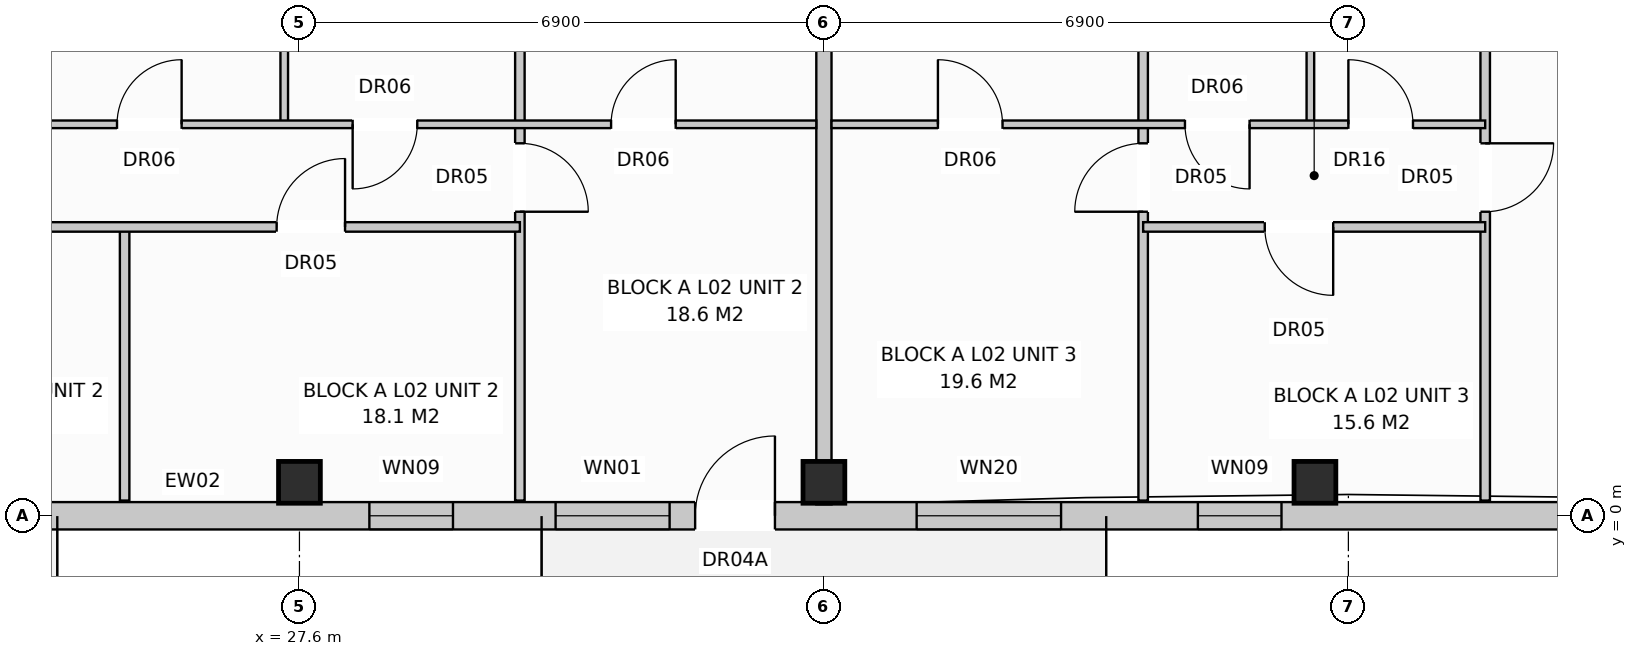
"""IFC4 building model, lengths in metres.
Left out: names, types, materials, properties, quantities, classifications, styles, units other than length and angle.
Written with IfcOpenShell. Run it as: python <this file> out.ifc"""

import sys

from ifc_helpers import new_model, si_unit, direction, frame, frame_2d, origin, origin_with_axes, origin_2d, place, context, subcontext, project, spatial, rectangle, extrude, element, fill, save


model = new_model("IFC4")
c1 = context("Model", 3, precision=1e-05, world=origin(), true_north=direction((0.0, 1.0)))
c2 = subcontext(c1, "Body", "Model", "MODEL_VIEW")
j1 = project(units=[si_unit("LENGTHUNIT", "METRE"), si_unit("PLANEANGLEUNIT", "RADIAN")], contexts=[c1])
p1 = place(None, origin())
s1 = spatial("IfcSite", under=j1, at=p1, CompositionType="ELEMENT")
p2 = place(p1, origin())
s2 = spatial("IfcBuilding", under=s1, at=p2, CompositionType="ELEMENT")
p3 = place(p2, frame((0.0, 0.0, 8.0)))
s3 = spatial("IfcBuildingStorey", under=s2, at=p3, CompositionType="ELEMENT", Elevation=8.0)
for number, where, z_axis, x_axis in (
    (1, (27.6, 0.44, 0.0), (0.0, 0.0, 1.0), (1.0, 0.0, 0.0)),
    (2, (34.5, 0.44, 0.0), (0.0, 0.0, 1.0), (1.0, 0.0, 0.0)),
    (3, (40.96, 0.44, 0.0), (0.0, 0.0, 1.0), (1.0, 0.0, 0.0)),
):
    element("IfcColumn", number, at=place(p3, frame(where, z_axis=z_axis, x_axis=x_axis)), inside=s3, PredefinedType="COLUMN", context=c2, shape_type="SweptSolid", body=[
        extrude(rectangle(XDim=0.55, YDim=0.55, at=origin_2d()), origin(), (0.0, 0.0, 1.0), 3.2),
    ])
p4 = place(p3, frame((0.17, 0.0, 0.0), z_axis=(0.0, 0.0, 1.0), x_axis=(1.0, 0.0, 0.0)))
e4 = element("IfcWall", 4, at=p4, inside=s3, PredefinedType="STANDARD", context=c2, shape_type="SweptSolid", body=[
    extrude(rectangle(XDim=54.86, YDim=0.36, at=frame_2d((27.43, 0.0))), origin(), (0.0, 0.0, 1.0), 2.94),
])
p5 = place(p4, frame((3.736, 0.0, 0.0)))
e5 = element("IfcOpeningElement", 5, at=p5, cuts=e4, PredefinedType="OPENING", context=c2, shape_type="SweptSolid", body=[
    extrude(rectangle(XDim=1.05, YDim=2.12, at=frame_2d((0.525, 1.06))), frame((0.0, 0.192, 0.0), z_axis=(0.0, -1.0, 0.0), x_axis=(1.0, 0.0, 0.0)), (0.0, 0.0, 1.0), 0.384),
])
p6 = place(p4, frame((18.636, 0.0, 0.0)))
e6 = element("IfcOpeningElement", 6, at=p6, cuts=e4, PredefinedType="OPENING", context=c2, shape_type="SweptSolid", body=[
    extrude(rectangle(XDim=1.05, YDim=2.12, at=frame_2d((0.525, 1.06))), frame((0.0, 0.192, 0.0), z_axis=(0.0, -1.0, 0.0), x_axis=(1.0, 0.0, 0.0)), (0.0, 0.0, 1.0), 0.384),
])
p7 = place(p4, frame((32.636, 0.0, 0.0)))
e7 = element("IfcOpeningElement", 7, at=p7, cuts=e4, PredefinedType="OPENING", context=c2, shape_type="SweptSolid", body=[
    extrude(rectangle(XDim=1.05, YDim=2.12, at=frame_2d((0.525, 1.06))), frame((0.0, 0.192, 0.0), z_axis=(0.0, -1.0, 0.0), x_axis=(1.0, 0.0, 0.0)), (0.0, 0.0, 1.0), 0.384),
])
p8 = place(p4, frame((46.441, 0.0, 0.0)))
e8 = element("IfcOpeningElement", 8, at=p8, cuts=e4, PredefinedType="OPENING", context=c2, shape_type="SweptSolid", body=[
    extrude(rectangle(XDim=1.05, YDim=2.12, at=frame_2d((0.525, 1.06))), frame((0.0, 0.192, 0.0), z_axis=(0.0, -1.0, 0.0), x_axis=(1.0, 0.0, 0.0)), (0.0, 0.0, 1.0), 0.384),
])
p9 = place(p4, frame((1.95, 0.0, 0.72)))
e9 = element("IfcOpeningElement", 9, at=p9, cuts=e4, PredefinedType="OPENING", context=c2, shape_type="SweptSolid", body=[
    extrude(rectangle(XDim=1.1, YDim=1.5, at=frame_2d((0.55, 0.75))), frame((0.0, 0.192, 0.0), z_axis=(0.0, -1.0, 0.0), x_axis=(1.0, 0.0, 0.0)), (0.0, 0.0, 1.0), 0.384),
])
p10 = place(p4, frame((7.232, 0.0, 0.72)))
e10 = element("IfcOpeningElement", 10, at=p10, cuts=e4, PredefinedType="OPENING", context=c2, shape_type="SweptSolid", body=[
    extrude(rectangle(XDim=1.9, YDim=1.85, at=frame_2d((0.95, 0.925))), frame((0.0, 0.192, 0.0), z_axis=(0.0, -1.0, 0.0), x_axis=(1.0, 0.0, 0.0)), (0.0, 0.0, 1.0), 0.384),
])
p11 = place(p4, frame((10.85, 0.0, 0.72)))
e11 = element("IfcOpeningElement", 11, at=p11, cuts=e4, PredefinedType="OPENING", context=c2, shape_type="SweptSolid", body=[
    extrude(rectangle(XDim=1.1, YDim=1.5, at=frame_2d((0.55, 0.75))), frame((0.0, 0.192, 0.0), z_axis=(0.0, -1.0, 0.0), x_axis=(1.0, 0.0, 0.0)), (0.0, 0.0, 1.0), 0.384),
])
p12 = place(p4, frame((16.25, 0.0, 0.72)))
e12 = element("IfcOpeningElement", 12, at=p12, cuts=e4, PredefinedType="OPENING", context=c2, shape_type="SweptSolid", body=[
    extrude(rectangle(XDim=1.1, YDim=1.5, at=frame_2d((0.55, 0.75))), frame((0.0, 0.192, 0.0), z_axis=(0.0, -1.0, 0.0), x_axis=(1.0, 0.0, 0.0)), (0.0, 0.0, 1.0), 0.384),
])
p13 = place(p4, frame((21.55, 0.0, 0.72)))
e13 = element("IfcOpeningElement", 13, at=p13, cuts=e4, PredefinedType="OPENING", context=c2, shape_type="SweptSolid", body=[
    extrude(rectangle(XDim=1.9, YDim=1.85, at=frame_2d((0.95, 0.925))), frame((0.0, 0.192, 0.0), z_axis=(0.0, -1.0, 0.0), x_axis=(1.0, 0.0, 0.0)), (0.0, 0.0, 1.0), 0.384),
])
p14 = place(p4, frame((28.35, 0.0, 0.72)))
e14 = element("IfcOpeningElement", 14, at=p14, cuts=e4, PredefinedType="OPENING", context=c2, shape_type="SweptSolid", body=[
    extrude(rectangle(XDim=1.1, YDim=1.5, at=frame_2d((0.55, 0.75))), frame((0.0, 0.192, 0.0), z_axis=(0.0, -1.0, 0.0), x_axis=(1.0, 0.0, 0.0)), (0.0, 0.0, 1.0), 0.384),
])
p15 = place(p4, frame((30.8, 0.0, 0.85)))
e15 = element("IfcOpeningElement", 15, at=p15, cuts=e4, PredefinedType="OPENING", context=c2, shape_type="SweptSolid", body=[
    extrude(rectangle(XDim=1.5, YDim=1.65, at=frame_2d((0.75, 0.825))), frame((0.0, 0.192, 0.0), z_axis=(0.0, -1.0, 0.0), x_axis=(1.0, 0.0, 0.0)), (0.0, 0.0, 1.0), 0.384),
])
p16 = place(p4, frame((35.55, 0.0, 0.72)))
e16 = element("IfcOpeningElement", 16, at=p16, cuts=e4, PredefinedType="OPENING", context=c2, shape_type="SweptSolid", body=[
    extrude(rectangle(XDim=1.9, YDim=1.85, at=frame_2d((0.95, 0.925))), frame((0.0, 0.192, 0.0), z_axis=(0.0, -1.0, 0.0), x_axis=(1.0, 0.0, 0.0)), (0.0, 0.0, 1.0), 0.384),
])
p17 = place(p4, frame((39.25, 0.0, 0.72)))
e17 = element("IfcOpeningElement", 17, at=p17, cuts=e4, PredefinedType="OPENING", context=c2, shape_type="SweptSolid", body=[
    extrude(rectangle(XDim=1.1, YDim=1.5, at=frame_2d((0.55, 0.75))), frame((0.0, 0.192, 0.0), z_axis=(0.0, -1.0, 0.0), x_axis=(1.0, 0.0, 0.0)), (0.0, 0.0, 1.0), 0.384),
])
p18 = place(p4, frame((44.3, 0.0, 0.8)))
e18 = element("IfcOpeningElement", 18, at=p18, cuts=e4, PredefinedType="OPENING", context=c2, shape_type="SweptSolid", body=[
    extrude(rectangle(XDim=1.8, YDim=1.7, at=frame_2d((0.9, 0.85))), frame((0.0, 0.192, 0.0), z_axis=(0.0, -1.0, 0.0), x_axis=(1.0, 0.0, 0.0)), (0.0, 0.0, 1.0), 0.384),
])
p19 = place(p4, frame((49.15, 0.0, 0.72)))
e19 = element("IfcOpeningElement", 19, at=p19, cuts=e4, PredefinedType="OPENING", context=c2, shape_type="SweptSolid", body=[
    extrude(rectangle(XDim=1.9, YDim=1.85, at=frame_2d((0.95, 0.925))), frame((0.0, 0.192, 0.0), z_axis=(0.0, -1.0, 0.0), x_axis=(1.0, 0.0, 0.0)), (0.0, 0.0, 1.0), 0.384),
])
p20 = place(p4, frame((52.95, 0.0, 0.72)))
e20 = element("IfcOpeningElement", 20, at=p20, cuts=e4, PredefinedType="OPENING", context=c2, shape_type="SweptSolid", body=[
    extrude(rectangle(XDim=1.1, YDim=1.5, at=frame_2d((0.55, 0.75))), frame((0.0, 0.192, 0.0), z_axis=(0.0, -1.0, 0.0), x_axis=(1.0, 0.0, 0.0)), (0.0, 0.0, 1.0), 0.384),
])
p21 = place(p3, frame((34.5, 7.85, 0.0), z_axis=(0.0, 0.0, 1.0), x_axis=(0.0, -1.0, 0.0)))
e21 = element("IfcWall", 21, at=p21, inside=s3, PredefinedType="PARTITIONING", context=c2, shape_type="SweptSolid", body=[
    extrude(rectangle(XDim=7.7, YDim=0.2, at=frame_2d((3.85, 0.0))), origin(), (0.0, 0.0, 1.0), 2.94),
])
p22 = place(p3, frame((27.4, 7.85, 0.0), z_axis=(0.0, 0.0, 1.0), x_axis=(0.0, -1.0, 0.0)))
e22 = element("IfcWall", 22, at=p22, inside=s3, PredefinedType="PARTITIONING", context=c2, shape_type="SweptSolid", body=[
    extrude(rectangle(XDim=2.7, YDim=0.1, at=frame_2d((1.35, 0.0))), origin(), (0.0, 0.0, 1.0), 2.94),
])
p23 = place(p3, frame((25.3, 3.8, 0.0), z_axis=(0.0, 0.0, 1.0), x_axis=(0.0, -1.0, 0.0)))
e23 = element("IfcWall", 23, at=p23, inside=s3, PredefinedType="PARTITIONING", context=c2, shape_type="SweptSolid", body=[
    extrude(rectangle(XDim=3.6, YDim=0.125, at=frame_2d((1.8, 0.0))), origin(), (0.0, 0.0, 1.0), 2.59),
])
p24 = place(p3, frame((30.5, 7.85, 0.0), z_axis=(0.0, 0.0, 1.0), x_axis=(0.0, -1.0, 0.0)))
e24 = element("IfcWall", 24, at=p24, inside=s3, PredefinedType="PARTITIONING", context=c2, shape_type="SweptSolid", body=[
    extrude(rectangle(XDim=7.65, YDim=0.125, at=frame_2d((3.825, 0.0))), origin(), (0.0, 0.0, 1.0), 2.94),
])
p25 = place(p24, frame((2.95, 0.0, 0.0)))
e25 = element("IfcOpeningElement", 25, at=p25, cuts=e24, PredefinedType="OPENING", context=c2, shape_type="SweptSolid", body=[
    extrude(rectangle(XDim=0.9, YDim=2.1, at=frame_2d((0.45, 1.05))), frame((0.0, 0.074, 0.0), z_axis=(0.0, -1.0, 0.0), x_axis=(1.0, 0.0, 0.0)), (0.0, 0.0, 1.0), 0.149),
])
p26 = place(p3, frame((20.1, 5.15, 0.0), z_axis=(0.0, 0.0, 1.0), x_axis=(1.0, 0.0, 0.0)))
e26 = element("IfcWall", 26, at=p26, inside=s3, PredefinedType="PARTITIONING", context=c2, shape_type="SweptSolid", body=[
    extrude(rectangle(XDim=14.3, YDim=0.1, at=frame_2d((7.15, 0.0))), origin(), (0.0, 0.0, 1.0), 2.94),
])
p27 = place(p26, frame((1.6, 0.0, 0.0)))
e27 = element("IfcOpeningElement", 27, at=p27, cuts=e26, PredefinedType="OPENING", context=c2, shape_type="SweptSolid", body=[
    extrude(rectangle(XDim=0.9, YDim=2.1, at=frame_2d((0.45, 1.05))), frame((0.0, 0.062, 0.0), z_axis=(0.0, -1.0, 0.0), x_axis=(1.0, 0.0, 0.0)), (0.0, 0.0, 1.0), 0.124),
])
p28 = place(p26, frame((5.1, 0.0, 0.0)))
e28 = element("IfcOpeningElement", 28, at=p28, cuts=e26, PredefinedType="OPENING", context=c2, shape_type="SweptSolid", body=[
    extrude(rectangle(XDim=0.85, YDim=2.05, at=frame_2d((0.425, 1.025))), frame((0.0, 0.062, 0.0), z_axis=(0.0, -1.0, 0.0), x_axis=(1.0, 0.0, 0.0)), (0.0, 0.0, 1.0), 0.124),
])
p29 = place(p26, frame((8.2, 0.0, 0.0)))
e29 = element("IfcOpeningElement", 29, at=p29, cuts=e26, PredefinedType="OPENING", context=c2, shape_type="SweptSolid", body=[
    extrude(rectangle(XDim=0.85, YDim=2.05, at=frame_2d((0.425, 1.025))), frame((0.0, 0.062, 0.0), z_axis=(0.0, -1.0, 0.0), x_axis=(1.0, 0.0, 0.0)), (0.0, 0.0, 1.0), 0.124),
])
p30 = place(p26, frame((11.6, 0.0, 0.0)))
e30 = element("IfcOpeningElement", 30, at=p30, cuts=e26, PredefinedType="OPENING", context=c2, shape_type="SweptSolid", body=[
    extrude(rectangle(XDim=0.85, YDim=2.05, at=frame_2d((0.425, 1.025))), frame((0.0, 0.062, 0.0), z_axis=(0.0, -1.0, 0.0), x_axis=(1.0, 0.0, 0.0)), (0.0, 0.0, 1.0), 0.124),
])
p31 = place(p3, frame((20.1, 3.8, 0.0), z_axis=(0.0, 0.0, 1.0), x_axis=(1.0, 0.0, 0.0)))
e31 = element("IfcWall", 31, at=p31, inside=s3, PredefinedType="PARTITIONING", context=c2, shape_type="SweptSolid", body=[
    extrude(rectangle(XDim=10.4, YDim=0.125, at=frame_2d((5.2, 0.0))), origin(), (0.0, 0.0, 1.0), 2.94),
])
p32 = place(p31, frame((2.0, 0.0, 0.0)))
e32 = element("IfcOpeningElement", 32, at=p32, cuts=e31, PredefinedType="OPENING", context=c2, shape_type="SweptSolid", body=[
    extrude(rectangle(XDim=0.9, YDim=2.1, at=frame_2d((0.45, 1.05))), frame((0.0, 0.074, 0.0), z_axis=(0.0, -1.0, 0.0), x_axis=(1.0, 0.0, 0.0)), (0.0, 0.0, 1.0), 0.149),
])
p33 = place(p31, frame((7.2, 0.0, 0.0)))
e33 = element("IfcOpeningElement", 33, at=p33, cuts=e31, PredefinedType="OPENING", context=c2, shape_type="SweptSolid", body=[
    extrude(rectangle(XDim=0.9, YDim=2.1, at=frame_2d((0.45, 1.05))), frame((0.0, 0.074, 0.0), z_axis=(0.0, -1.0, 0.0), x_axis=(1.0, 0.0, 0.0)), (0.0, 0.0, 1.0), 0.149),
])
p34 = place(p3, frame((43.2, 7.85, 0.0), z_axis=(0.0, 0.0, 1.0), x_axis=(0.0, -1.0, 0.0)))
e34 = element("IfcWall", 34, at=p34, inside=s3, PredefinedType="PARTITIONING", context=c2, shape_type="SweptSolid", body=[
    extrude(rectangle(XDim=7.65, YDim=0.125, at=frame_2d((3.825, 0.0))), origin(), (0.0, 0.0, 1.0), 2.59),
])
p35 = place(p34, frame((2.95, 0.0, 0.0)))
e35 = element("IfcOpeningElement", 35, at=p35, cuts=e34, PredefinedType="OPENING", context=c2, shape_type="SweptSolid", body=[
    extrude(rectangle(XDim=0.9, YDim=2.1, at=frame_2d((0.45, 1.05))), frame((0.0, 0.074, 0.0), z_axis=(0.0, -1.0, 0.0), x_axis=(1.0, 0.0, 0.0)), (0.0, 0.0, 1.0), 0.149),
])
p36 = place(p3, frame((38.7, 7.85, 0.0), z_axis=(0.0, 0.0, 1.0), x_axis=(0.0, -1.0, 0.0)))
e36 = element("IfcWall", 36, at=p36, inside=s3, PredefinedType="PARTITIONING", context=c2, shape_type="SweptSolid", body=[
    extrude(rectangle(XDim=7.65, YDim=0.125, at=frame_2d((3.825, 0.0))), origin(), (0.0, 0.0, 1.0), 2.94),
])
p37 = place(p36, frame((2.95, 0.0, 0.0)))
e37 = element("IfcOpeningElement", 37, at=p37, cuts=e36, PredefinedType="OPENING", context=c2, shape_type="SweptSolid", body=[
    extrude(rectangle(XDim=0.9, YDim=2.1, at=frame_2d((0.45, 1.05))), frame((0.0, 0.074, 0.0), z_axis=(0.0, -1.0, 0.0), x_axis=(1.0, 0.0, 0.0)), (0.0, 0.0, 1.0), 0.149),
])
p38 = place(p3, frame((40.9, 7.85, 0.0), z_axis=(0.0, 0.0, 1.0), x_axis=(0.0, -1.0, 0.0)))
e38 = element("IfcWall", 38, at=p38, inside=s3, PredefinedType="PARTITIONING", context=c2, shape_type="SweptSolid", body=[
    extrude(rectangle(XDim=2.7, YDim=0.1, at=frame_2d((1.35, 0.0))), origin(), (0.0, 0.0, 1.0), 2.94),
])
p39 = place(p3, frame((34.6, 5.15, 0.0), z_axis=(0.0, 0.0, 1.0), x_axis=(1.0, 0.0, 0.0)))
e39 = element("IfcWall", 39, at=p39, inside=s3, PredefinedType="PARTITIONING", context=c2, shape_type="SweptSolid", body=[
    extrude(rectangle(XDim=8.6, YDim=0.1, at=frame_2d((4.3, 0.0))), origin(), (0.0, 0.0, 1.0), 2.94),
])
p40 = place(p39, frame((1.4, 0.0, 0.0)))
e40 = element("IfcOpeningElement", 40, at=p40, cuts=e39, PredefinedType="OPENING", context=c2, shape_type="SweptSolid", body=[
    extrude(rectangle(XDim=0.85, YDim=2.05, at=frame_2d((0.425, 1.025))), frame((0.0, 0.062, 0.0), z_axis=(0.0, -1.0, 0.0), x_axis=(1.0, 0.0, 0.0)), (0.0, 0.0, 1.0), 0.124),
])
p41 = place(p39, frame((4.65, 0.0, 0.0)))
e41 = element("IfcOpeningElement", 41, at=p41, cuts=e39, PredefinedType="OPENING", context=c2, shape_type="SweptSolid", body=[
    extrude(rectangle(XDim=0.85, YDim=2.05, at=frame_2d((0.425, 1.025))), frame((0.0, 0.062, 0.0), z_axis=(0.0, -1.0, 0.0), x_axis=(1.0, 0.0, 0.0)), (0.0, 0.0, 1.0), 0.124),
])
p42 = place(p39, frame((6.8, 0.0, 0.0)))
e42 = element("IfcOpeningElement", 42, at=p42, cuts=e39, PredefinedType="OPENING", context=c2, shape_type="SweptSolid", body=[
    extrude(rectangle(XDim=0.85, YDim=2.1, at=frame_2d((0.425, 1.05))), frame((0.0, 0.062, 0.0), z_axis=(0.0, -1.0, 0.0), x_axis=(1.0, 0.0, 0.0)), (0.0, 0.0, 1.0), 0.124),
])
p43 = place(p3, frame((38.7, 3.8, 0.0), z_axis=(0.0, 0.0, 1.0), x_axis=(1.0, 0.0, 0.0)))
e43 = element("IfcWall", 43, at=p43, inside=s3, PredefinedType="PARTITIONING", context=c2, shape_type="SweptSolid", body=[
    extrude(rectangle(XDim=4.5, YDim=0.125, at=frame_2d((2.25, 0.0))), origin(), (0.0, 0.0, 1.0), 2.94),
])
p44 = place(p43, frame((1.6, 0.0, 0.0)))
e44 = element("IfcOpeningElement", 44, at=p44, cuts=e43, PredefinedType="OPENING", context=c2, shape_type="SweptSolid", body=[
    extrude(rectangle(XDim=0.9, YDim=2.1, at=frame_2d((0.45, 1.05))), frame((0.0, 0.074, 0.0), z_axis=(0.0, -1.0, 0.0), x_axis=(1.0, 0.0, 0.0)), (0.0, 0.0, 1.0), 0.149),
])
p45 = place(p7, origin_with_axes())
e45 = element("IfcDoor", 45, at=p45, inside=s3, OperationType="SINGLE_SWING_RIGHT", PredefinedType="DOOR", context=c2, shape_type="SweptSolid", body=[
    extrude(rectangle(XDim=1.05, YDim=2.12, at=frame_2d((0.525, 1.06))), frame((0.0, 0.025, 0.0), z_axis=(0.0, -1.0, 0.0), x_axis=(1.0, 0.0, 0.0)), (0.0, 0.0, 1.0), 0.05),
])
fill(e7, e45)
p46 = place(p14, origin_with_axes())
e46 = element("IfcWindow", 46, at=p46, inside=s3, PartitioningType="SINGLE_PANEL", PredefinedType="WINDOW", context=c2, shape_type="SweptSolid", body=[
    extrude(rectangle(XDim=1.1, YDim=1.5, at=frame_2d((0.55, 0.75))), frame((0.0, 0.03, 0.0), z_axis=(0.0, -1.0, 0.0), x_axis=(1.0, 0.0, 0.0)), (0.0, 0.0, 1.0), 0.06),
])
fill(e14, e46)
p47 = place(p15, origin_with_axes())
e47 = element("IfcWindow", 47, at=p47, inside=s3, PartitioningType="SINGLE_PANEL", PredefinedType="WINDOW", context=c2, shape_type="SweptSolid", body=[
    extrude(rectangle(XDim=1.5, YDim=1.65, at=frame_2d((0.75, 0.825))), frame((0.0, 0.03, 0.0), z_axis=(0.0, -1.0, 0.0), x_axis=(1.0, 0.0, 0.0)), (0.0, 0.0, 1.0), 0.06),
])
fill(e15, e47)
p48 = place(p16, origin_with_axes())
e48 = element("IfcWindow", 48, at=p48, inside=s3, PartitioningType="SINGLE_PANEL", PredefinedType="WINDOW", context=c2, shape_type="SweptSolid", body=[
    extrude(rectangle(XDim=1.9, YDim=1.85, at=frame_2d((0.95, 0.925))), frame((0.0, 0.03, 0.0), z_axis=(0.0, -1.0, 0.0), x_axis=(1.0, 0.0, 0.0)), (0.0, 0.0, 1.0), 0.06),
])
fill(e16, e48)
p49 = place(p17, origin_with_axes())
e49 = element("IfcWindow", 49, at=p49, inside=s3, PartitioningType="SINGLE_PANEL", PredefinedType="WINDOW", context=c2, shape_type="SweptSolid", body=[
    extrude(rectangle(XDim=1.1, YDim=1.5, at=frame_2d((0.55, 0.75))), frame((0.0, 0.03, 0.0), z_axis=(0.0, -1.0, 0.0), x_axis=(1.0, 0.0, 0.0)), (0.0, 0.0, 1.0), 0.06),
])
fill(e17, e49)
p50 = place(p25, origin_with_axes())
e50 = element("IfcDoor", 50, at=p50, inside=s3, OperationType="SINGLE_SWING_RIGHT", PredefinedType="DOOR", context=c2, shape_type="SweptSolid", body=[
    extrude(rectangle(XDim=0.9, YDim=2.1, at=frame_2d((0.45, 1.05))), frame((0.0, 0.025, 0.0), z_axis=(0.0, -1.0, 0.0), x_axis=(1.0, 0.0, 0.0)), (0.0, 0.0, 1.0), 0.05),
])
fill(e25, e50)
p51 = place(p28, origin_with_axes())
e51 = element("IfcDoor", 51, at=p51, inside=s3, OperationType="SINGLE_SWING_RIGHT", PredefinedType="DOOR", context=c2, shape_type="SweptSolid", body=[
    extrude(rectangle(XDim=0.85, YDim=2.05, at=frame_2d((0.425, 1.025))), frame((0.0, 0.025, 0.0), z_axis=(0.0, -1.0, 0.0), x_axis=(1.0, 0.0, 0.0)), (0.0, 0.0, 1.0), 0.05),
])
fill(e28, e51)
p52 = place(p29, frame((0.85, 0.0, 0.0), z_axis=(0.0, 0.0, 1.0), x_axis=(-1.0, 0.0, 0.0)))
e52 = element("IfcDoor", 52, at=p52, inside=s3, OperationType="SINGLE_SWING_LEFT", PredefinedType="DOOR", context=c2, shape_type="SweptSolid", body=[
    extrude(rectangle(XDim=0.85, YDim=2.05, at=frame_2d((0.425, 1.025))), frame((0.0, 0.025, 0.0), z_axis=(0.0, -1.0, 0.0), x_axis=(1.0, 0.0, 0.0)), (0.0, 0.0, 1.0), 0.05),
])
fill(e29, e52)
p53 = place(p30, origin_with_axes())
e53 = element("IfcDoor", 53, at=p53, inside=s3, OperationType="SINGLE_SWING_RIGHT", PredefinedType="DOOR", context=c2, shape_type="SweptSolid", body=[
    extrude(rectangle(XDim=0.85, YDim=2.05, at=frame_2d((0.425, 1.025))), frame((0.0, 0.025, 0.0), z_axis=(0.0, -1.0, 0.0), x_axis=(1.0, 0.0, 0.0)), (0.0, 0.0, 1.0), 0.05),
])
fill(e30, e53)
p54 = place(p33, origin_with_axes())
e54 = element("IfcDoor", 54, at=p54, inside=s3, OperationType="SINGLE_SWING_RIGHT", PredefinedType="DOOR", context=c2, shape_type="SweptSolid", body=[
    extrude(rectangle(XDim=0.9, YDim=2.1, at=frame_2d((0.45, 1.05))), frame((0.0, 0.025, 0.0), z_axis=(0.0, -1.0, 0.0), x_axis=(1.0, 0.0, 0.0)), (0.0, 0.0, 1.0), 0.05),
])
fill(e33, e54)
p55 = place(p35, origin_with_axes())
e55 = element("IfcDoor", 55, at=p55, inside=s3, OperationType="SINGLE_SWING_LEFT", PredefinedType="DOOR", context=c2, shape_type="SweptSolid", body=[
    extrude(rectangle(XDim=0.9, YDim=2.1, at=frame_2d((0.45, 1.05))), frame((0.0, 0.025, 0.0), z_axis=(0.0, -1.0, 0.0), x_axis=(1.0, 0.0, 0.0)), (0.0, 0.0, 1.0), 0.05),
])
fill(e35, e55)
p56 = place(p37, frame((0.9, 0.0, 0.0), z_axis=(0.0, 0.0, 1.0), x_axis=(-1.0, 0.0, 0.0)))
e56 = element("IfcDoor", 56, at=p56, inside=s3, OperationType="SINGLE_SWING_RIGHT", PredefinedType="DOOR", context=c2, shape_type="SweptSolid", body=[
    extrude(rectangle(XDim=0.9, YDim=2.1, at=frame_2d((0.45, 1.05))), frame((0.0, 0.025, 0.0), z_axis=(0.0, -1.0, 0.0), x_axis=(1.0, 0.0, 0.0)), (0.0, 0.0, 1.0), 0.05),
])
fill(e37, e56)
p57 = place(p40, origin_with_axes())
e57 = element("IfcDoor", 57, at=p57, inside=s3, OperationType="SINGLE_SWING_LEFT", PredefinedType="DOOR", context=c2, shape_type="SweptSolid", body=[
    extrude(rectangle(XDim=0.85, YDim=2.05, at=frame_2d((0.425, 1.025))), frame((0.0, 0.025, 0.0), z_axis=(0.0, -1.0, 0.0), x_axis=(1.0, 0.0, 0.0)), (0.0, 0.0, 1.0), 0.05),
])
fill(e40, e57)
p58 = place(p41, frame((0.85, 0.0, 0.0), z_axis=(0.0, 0.0, 1.0), x_axis=(-1.0, 0.0, 0.0)))
e58 = element("IfcDoor", 58, at=p58, inside=s3, OperationType="SINGLE_SWING_RIGHT", PredefinedType="DOOR", context=c2, shape_type="SweptSolid", body=[
    extrude(rectangle(XDim=0.85, YDim=2.05, at=frame_2d((0.425, 1.025))), frame((0.0, 0.025, 0.0), z_axis=(0.0, -1.0, 0.0), x_axis=(1.0, 0.0, 0.0)), (0.0, 0.0, 1.0), 0.05),
])
fill(e41, e58)
p59 = place(p42, origin_with_axes())
e59 = element("IfcDoor", 59, at=p59, inside=s3, OperationType="SINGLE_SWING_LEFT", PredefinedType="DOOR", context=c2, shape_type="SweptSolid", body=[
    extrude(rectangle(XDim=0.85, YDim=2.1, at=frame_2d((0.425, 1.05))), frame((0.0, 0.025, 0.0), z_axis=(0.0, -1.0, 0.0), x_axis=(1.0, 0.0, 0.0)), (0.0, 0.0, 1.0), 0.05),
])
fill(e42, e59)
p60 = place(p44, frame((0.9, 0.0, 0.0), z_axis=(0.0, 0.0, 1.0), x_axis=(-1.0, 0.0, 0.0)))
e60 = element("IfcDoor", 60, at=p60, inside=s3, OperationType="SINGLE_SWING_RIGHT", PredefinedType="DOOR", context=c2, shape_type="SweptSolid", body=[
    extrude(rectangle(XDim=0.9, YDim=2.1, at=frame_2d((0.45, 1.05))), frame((0.0, 0.025, 0.0), z_axis=(0.0, -1.0, 0.0), x_axis=(1.0, 0.0, 0.0)), (0.0, 0.0, 1.0), 0.05),
])
fill(e44, e60)
save(model, sys.argv[1])
